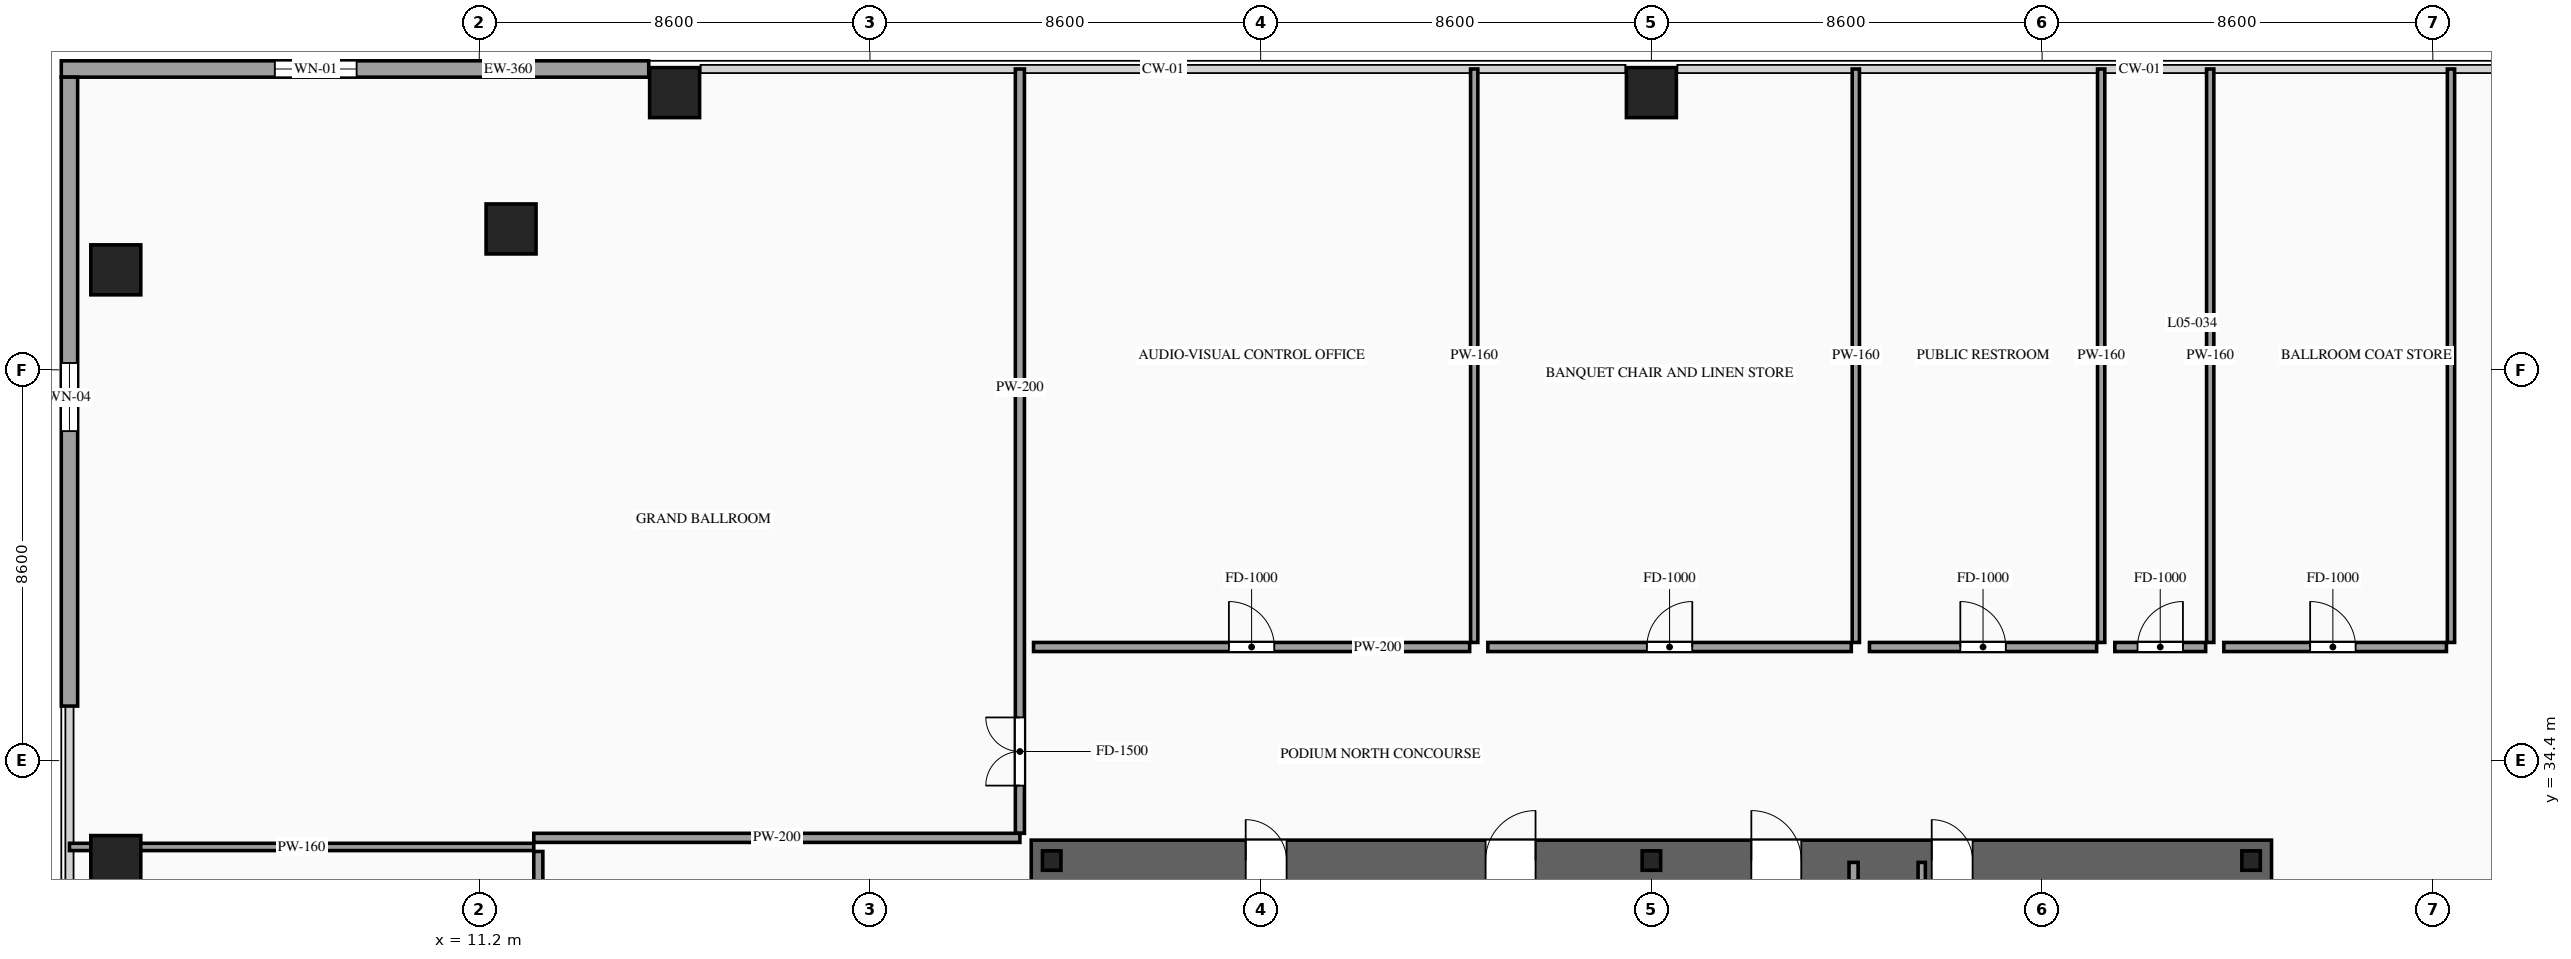
"""IFC4 building model, lengths in metres.
Left out: names, types, materials, properties, quantities, classifications, styles, units other than length and angle.
Written with IfcOpenShell. Run it as: python <this file> out.ifc"""

import sys

from ifc_helpers import new_model, si_unit, direction, frame, frame_2d, origin, origin_2d, place, context, subcontext, project, spatial, rectangle, i_section, extrude, source, transform, mapped, element, fill, save


model = new_model("IFC4")
c1 = context("Model", 3, precision=1e-05, world=origin(), true_north=direction((0.0, 1.0)))
c2 = subcontext(c1, "Body", "Model", "MODEL_VIEW")
j1 = project(units=[si_unit("LENGTHUNIT", "METRE"), si_unit("PLANEANGLEUNIT", "RADIAN")], contexts=[c1])
p1 = place(None, origin())
s1 = spatial("IfcSite", under=j1, at=p1, CompositionType="ELEMENT")
p2 = place(p1, origin())
s2 = spatial("IfcBuilding", under=s1, at=p2, CompositionType="ELEMENT")
p3 = place(p2, frame((0.0, 0.0, 19.8)))
s3 = spatial("IfcBuildingStorey", under=s2, at=p3, CompositionType="ELEMENT", Elevation=19.8)
p4 = place(p3, frame((23.35, 32.2, 0.0), z_axis=(0.0, 0.0, 1.0), x_axis=(1.0, 0.0, 0.0)))
e1 = element("IfcWall", 1, at=p4, inside=s3, PredefinedType="SHEAR", context=c2, shape_type="SweptSolid", body=[
    extrude(rectangle(XDim=27.3, YDim=0.9, at=frame_2d((13.65, 0.0))), origin(), (0.0, 0.0, 1.0), 6.0),
])
p5 = place(p4, frame((4.72, 0.0, 0.0)))
e2 = element("IfcOpeningElement", 2, at=p5, cuts=e1, PredefinedType="OPENING", context=c2, shape_type="SweptSolid", body=[
    extrude(rectangle(XDim=0.9, YDim=2.15, at=frame_2d((0.45, 1.075))), frame((0.0, 0.465, 0.0), z_axis=(0.0, -1.0, 0.0), x_axis=(1.0, 0.0, 0.0)), (0.0, 0.0, 1.0), 0.93),
])
p6 = place(p4, frame((10.0, 0.0, 0.0)))
e3 = element("IfcOpeningElement", 3, at=p6, cuts=e1, PredefinedType="OPENING", context=c2, shape_type="SweptSolid", body=[
    extrude(rectangle(XDim=1.1, YDim=2.2, at=frame_2d((0.55, 1.1))), frame((0.0, 0.465, 0.0), z_axis=(0.0, -1.0, 0.0), x_axis=(1.0, 0.0, 0.0)), (0.0, 0.0, 1.0), 0.93),
])
p7 = place(p4, frame((15.85, 0.0, 0.0)))
e4 = element("IfcOpeningElement", 4, at=p7, cuts=e1, PredefinedType="OPENING", context=c2, shape_type="SweptSolid", body=[
    extrude(rectangle(XDim=1.1, YDim=2.2, at=frame_2d((0.55, 1.1))), frame((0.0, 0.465, 0.0), z_axis=(0.0, -1.0, 0.0), x_axis=(1.0, 0.0, 0.0)), (0.0, 0.0, 1.0), 0.93),
])
p8 = place(p4, frame((19.82, 0.0, 0.0)))
e5 = element("IfcOpeningElement", 5, at=p8, cuts=e1, PredefinedType="OPENING", context=c2, shape_type="SweptSolid", body=[
    extrude(rectangle(XDim=0.9, YDim=2.15, at=frame_2d((0.45, 1.075))), frame((0.0, 0.465, 0.0), z_axis=(0.0, -1.0, 0.0), x_axis=(1.0, 0.0, 0.0)), (0.0, 0.0, 1.0), 0.93),
])
m1 = source(origin(), c2, "Body", "SweptSolid", [
    extrude(i_section(OverallWidth=0.407, OverallDepth=0.428, WebThickness=0.02, FlangeThickness=0.035, at=origin_2d()), origin(), (0.0, 0.0, 1.0), 6.0),
])
for number, where, z_axis, x_axis in (
    (6, (23.8, 32.2, 0.0), (0.0, 0.0, 1.0), (1.0, 0.0, 0.0)),
    (7, (37.0, 32.2, 0.0), (0.0, 0.0, 1.0), (1.0, 0.0, 0.0)),
    (8, (50.2, 32.2, 0.0), (0.0, 0.0, 1.0), (1.0, 0.0, 0.0)),
):
    element("IfcColumn", number, at=place(p3, frame(where, z_axis=z_axis, x_axis=x_axis)), inside=s3, PredefinedType="COLUMN", context=c2, shape_type="MappedRepresentation", body=[
        mapped(m1, transform((0.0, 0.0, 0.0), scale=1.0)),
    ])
m2 = source(origin(), c2, "Body", "SweptSolid", [
    extrude(rectangle(XDim=1.1, YDim=1.1, at=origin_2d()), origin(), (0.0, 0.0, 1.0), 6.0),
])
for number, where, z_axis, x_axis in (
    (9, (3.2, 32.2, 0.0), (0.0, 0.0, 1.0), (1.0, 0.0, 0.0)),
    (10, (3.2, 45.2, 0.0), (0.0, 0.0, 1.0), (1.0, 0.0, 0.0)),
    (11, (11.9, 46.1, 0.0), (0.0, 0.0, 1.0), (1.0, 0.0, 0.0)),
    (12, (15.5, 49.1, 0.0), (0.0, 0.0, 1.0), (1.0, 0.0, 0.0)),
    (13, (37.0, 49.1, 0.0), (0.0, 0.0, 1.0), (1.0, 0.0, 0.0)),
):
    element("IfcColumn", number, at=place(p3, frame(where, z_axis=z_axis, x_axis=x_axis)), inside=s3, PredefinedType="COLUMN", context=c2, shape_type="MappedRepresentation", body=[
        mapped(m2, transform((0.0, 0.0, 0.0), scale=1.0)),
    ])
p9 = place(p3, frame((2.0, 49.62, 0.0), z_axis=(0.0, 0.0, 1.0), x_axis=(1.0, 0.0, 0.0)))
e14 = element("IfcWall", 14, at=p9, inside=s3, PredefinedType="SOLIDWALL", context=c2, shape_type="SweptSolid", body=[
    extrude(rectangle(XDim=12.93, YDim=0.36, at=frame_2d((6.465, 0.0))), origin(), (0.0, 0.0, 1.0), 5.68),
])
p10 = place(p9, frame((4.7, 0.0, 0.9)))
e15 = element("IfcOpeningElement", 15, at=p10, cuts=e14, PredefinedType="OPENING", context=c2, shape_type="SweptSolid", body=[
    extrude(rectangle(XDim=1.8, YDim=2.2, at=frame_2d((0.9, 1.1))), frame((0.0, 0.195, 0.0), z_axis=(0.0, -1.0, 0.0), x_axis=(1.0, 0.0, 0.0)), (0.0, 0.0, 1.0), 0.39),
])
p11 = place(p3, frame((2.18, 35.6, 0.0), z_axis=(0.0, 0.0, 1.0), x_axis=(0.0, 1.0, 0.0)))
e16 = element("IfcWall", 16, at=p11, inside=s3, PredefinedType="SOLIDWALL", context=c2, shape_type="SweptSolid", body=[
    extrude(rectangle(XDim=13.84, YDim=0.36, at=frame_2d((6.92, 0.0))), origin(), (0.0, 0.0, 1.0), 5.68),
])
p12 = place(p11, frame((6.05, 0.0, 0.9)))
e17 = element("IfcOpeningElement", 17, at=p12, cuts=e16, PredefinedType="OPENING", context=c2, shape_type="SweptSolid", body=[
    extrude(rectangle(XDim=1.5, YDim=1.8, at=frame_2d((0.75, 0.9))), frame((0.0, 0.195, 0.0), z_axis=(0.0, -1.0, 0.0), x_axis=(1.0, 0.0, 0.0)), (0.0, 0.0, 1.0), 0.39),
])
m3 = source(origin(), c2, "Body", "SweptSolid", [
    extrude(rectangle(XDim=12.72, YDim=0.2, at=frame_2d((6.36, 0.0))), origin(), (0.0, 0.0, 1.0), 5.68),
])
p13 = place(p3, frame((41.45, 19.44, 0.0), z_axis=(0.0, 0.0, 1.0), x_axis=(0.0, 1.0, 0.0)))
e18 = element("IfcWall", 18, at=p13, inside=s3, PredefinedType="PARTITIONING", context=c2, shape_type="MappedRepresentation", body=[
    mapped(m3, transform((0.0, 0.0, 0.0), scale=1.0)),
])
m4 = source(origin(), c2, "Body", "SweptSolid", [
    extrude(rectangle(XDim=10.72, YDim=0.16, at=frame_2d((5.36, 0.0))), origin(), (0.0, 0.0, 1.0), 5.68),
])
p14 = place(p3, frame((42.95, 21.44, 0.0), z_axis=(0.0, 0.0, 1.0), x_axis=(0.0, 1.0, 0.0)))
e19 = element("IfcWall", 19, at=p14, inside=s3, PredefinedType="PARTITIONING", context=c2, shape_type="MappedRepresentation", body=[
    mapped(m4, transform((0.0, 0.0, 0.0), scale=1.0)),
])
p15 = place(p3, frame((23.1, 32.8, 0.0), z_axis=(0.0, 0.0, 1.0), x_axis=(0.0, 1.0, 0.0)))
e20 = element("IfcWall", 20, at=p15, inside=s3, PredefinedType="PARTITIONING", context=c2, shape_type="SweptSolid", body=[
    extrude(rectangle(XDim=16.82, YDim=0.2, at=frame_2d((8.41, 0.0))), origin(), (0.0, 0.0, 1.0), 5.68),
])
p16 = place(p15, frame((1.05, 0.0, 0.0)))
e21 = element("IfcOpeningElement", 21, at=p16, cuts=e20, PredefinedType="OPENING", context=c2, shape_type="SweptSolid", body=[
    extrude(rectangle(XDim=1.5, YDim=2.3, at=frame_2d((0.75, 1.15))), frame((0.0, 0.115, 0.0), z_axis=(0.0, -1.0, 0.0), x_axis=(1.0, 0.0, 0.0)), (0.0, 0.0, 1.0), 0.23),
])
m5 = source(origin(), c2, "Body", "SweptSolid", [
    extrude(rectangle(XDim=10.7, YDim=0.2, at=frame_2d((5.35, 0.0))), origin(), (0.0, 0.0, 1.0), 5.68),
])
p17 = place(p3, frame((12.4, 32.7, 0.0), z_axis=(0.0, 0.0, 1.0), x_axis=(1.0, 0.0, 0.0)))
e22 = element("IfcWall", 22, at=p17, inside=s3, PredefinedType="PARTITIONING", context=c2, shape_type="MappedRepresentation", body=[
    mapped(m5, transform((0.0, 0.0, 0.0), scale=1.0)),
])
p18 = place(p3, frame((12.5, 12.0, 0.0), z_axis=(0.0, 0.0, 1.0), x_axis=(0.0, 1.0, 0.0)))
e23 = element("IfcWall", 23, at=p18, inside=s3, PredefinedType="PARTITIONING", context=c2, shape_type="SweptSolid", body=[
    extrude(rectangle(XDim=20.4, YDim=0.2, at=frame_2d((10.2, 0.0))), origin(), (0.0, 0.0, 1.0), 5.68),
])
p19 = place(p18, frame((5.0, 0.0, 0.0)))
e24 = element("IfcOpeningElement", 24, at=p19, cuts=e23, PredefinedType="OPENING", context=c2, shape_type="SweptSolid", body=[
    extrude(rectangle(XDim=1.0, YDim=2.2, at=frame_2d((0.5, 1.1))), frame((0.0, 0.115, 0.0), z_axis=(0.0, -1.0, 0.0), x_axis=(1.0, 0.0, 0.0)), (0.0, 0.0, 1.0), 0.23),
])
m6 = source(origin(), c2, "Body", "SweptSolid", [
    extrude(rectangle(XDim=10.22, YDim=0.16, at=frame_2d((5.11, 0.0))), origin(), (0.0, 0.0, 1.0), 5.68),
])
p20 = place(p3, frame((2.18, 32.5, 0.0), z_axis=(0.0, 0.0, 1.0), x_axis=(1.0, 0.0, 0.0)))
e25 = element("IfcWall", 25, at=p20, inside=s3, PredefinedType="PARTITIONING", context=c2, shape_type="MappedRepresentation", body=[
    mapped(m6, transform((0.0, 0.0, 0.0), scale=1.0)),
])
p21 = place(p3, frame((23.4, 36.9, 0.0), z_axis=(0.0, 0.0, 1.0), x_axis=(1.0, 0.0, 0.0)))
e26 = element("IfcWall", 26, at=p21, inside=s3, PredefinedType="PARTITIONING", context=c2, shape_type="SweptSolid", body=[
    extrude(rectangle(XDim=9.6, YDim=0.2, at=frame_2d((4.8, 0.0))), origin(), (0.0, 0.0, 1.0), 5.68),
])
p22 = place(p21, frame((4.3, 0.0, 0.0)))
e27 = element("IfcOpeningElement", 27, at=p22, cuts=e26, PredefinedType="OPENING", context=c2, shape_type="SweptSolid", body=[
    extrude(rectangle(XDim=1.0, YDim=2.2, at=frame_2d((0.5, 1.1))), frame((0.0, 0.115, 0.0), z_axis=(0.0, -1.0, 0.0), x_axis=(1.0, 0.0, 0.0)), (0.0, 0.0, 1.0), 0.23),
])
m7 = source(origin(), c2, "Body", "SweptSolid", [
    extrude(rectangle(XDim=12.62, YDim=0.16, at=frame_2d((6.31, 0.0))), origin(), (0.0, 0.0, 1.0), 5.68),
])
p23 = place(p3, frame((33.1, 37.0, 0.0), z_axis=(0.0, 0.0, 1.0), x_axis=(0.0, 1.0, 0.0)))
e28 = element("IfcWall", 28, at=p23, inside=s3, PredefinedType="PARTITIONING", context=c2, shape_type="MappedRepresentation", body=[
    mapped(m7, transform((0.0, 0.0, 0.0), scale=1.0)),
])
p24 = place(p3, frame((33.4, 36.9, 0.0), z_axis=(0.0, 0.0, 1.0), x_axis=(1.0, 0.0, 0.0)))
e29 = element("IfcWall", 29, at=p24, inside=s3, PredefinedType="PARTITIONING", context=c2, shape_type="SweptSolid", body=[
    extrude(rectangle(XDim=8.0, YDim=0.2, at=frame_2d((4.0, 0.0))), origin(), (0.0, 0.0, 1.0), 5.68),
])
p25 = place(p24, frame((3.5, 0.0, 0.0)))
e30 = element("IfcOpeningElement", 30, at=p25, cuts=e29, PredefinedType="OPENING", context=c2, shape_type="SweptSolid", body=[
    extrude(rectangle(XDim=1.0, YDim=2.2, at=frame_2d((0.5, 1.1))), frame((0.0, 0.115, 0.0), z_axis=(0.0, -1.0, 0.0), x_axis=(1.0, 0.0, 0.0)), (0.0, 0.0, 1.0), 0.23),
])
p26 = place(p3, frame((41.5, 37.0, 0.0), z_axis=(0.0, 0.0, 1.0), x_axis=(0.0, 1.0, 0.0)))
e31 = element("IfcWall", 31, at=p26, inside=s3, PredefinedType="PARTITIONING", context=c2, shape_type="MappedRepresentation", body=[
    mapped(m7, transform((0.0, 0.0, 0.0), scale=1.0)),
])
p27 = place(p3, frame((41.8, 36.9, 0.0), z_axis=(0.0, 0.0, 1.0), x_axis=(1.0, 0.0, 0.0)))
e32 = element("IfcWall", 32, at=p27, inside=s3, PredefinedType="PARTITIONING", context=c2, shape_type="SweptSolid", body=[
    extrude(rectangle(XDim=5.0, YDim=0.2, at=frame_2d((2.5, 0.0))), origin(), (0.0, 0.0, 1.0), 5.68),
])
p28 = place(p27, frame((2.0, 0.0, 0.0)))
e33 = element("IfcOpeningElement", 33, at=p28, cuts=e32, PredefinedType="OPENING", context=c2, shape_type="SweptSolid", body=[
    extrude(rectangle(XDim=1.0, YDim=2.2, at=frame_2d((0.5, 1.1))), frame((0.0, 0.115, 0.0), z_axis=(0.0, -1.0, 0.0), x_axis=(1.0, 0.0, 0.0)), (0.0, 0.0, 1.0), 0.23),
])
p29 = place(p3, frame((46.9, 37.0, 0.0), z_axis=(0.0, 0.0, 1.0), x_axis=(0.0, 1.0, 0.0)))
e34 = element("IfcWall", 34, at=p29, inside=s3, PredefinedType="PARTITIONING", context=c2, shape_type="MappedRepresentation", body=[
    mapped(m7, transform((0.0, 0.0, 0.0), scale=1.0)),
])
p30 = place(p3, frame((47.2, 36.9, 0.0), z_axis=(0.0, 0.0, 1.0), x_axis=(1.0, 0.0, 0.0)))
e35 = element("IfcWall", 35, at=p30, inside=s3, PredefinedType="PARTITIONING", context=c2, shape_type="SweptSolid", body=[
    extrude(rectangle(XDim=2.0, YDim=0.2, at=frame_2d((1.0, 0.0))), origin(), (0.0, 0.0, 1.0), 5.68),
])
p31 = place(p30, frame((0.5, 0.0, 0.0)))
e36 = element("IfcOpeningElement", 36, at=p31, cuts=e35, PredefinedType="OPENING", context=c2, shape_type="SweptSolid", body=[
    extrude(rectangle(XDim=1.0, YDim=2.2, at=frame_2d((0.5, 1.1))), frame((0.0, 0.115, 0.0), z_axis=(0.0, -1.0, 0.0), x_axis=(1.0, 0.0, 0.0)), (0.0, 0.0, 1.0), 0.23),
])
p32 = place(p3, frame((49.3, 37.0, 0.0), z_axis=(0.0, 0.0, 1.0), x_axis=(0.0, 1.0, 0.0)))
e37 = element("IfcWall", 37, at=p32, inside=s3, PredefinedType="PARTITIONING", context=c2, shape_type="MappedRepresentation", body=[
    mapped(m7, transform((0.0, 0.0, 0.0), scale=1.0)),
])
p33 = place(p3, frame((49.6, 36.9, 0.0), z_axis=(0.0, 0.0, 1.0), x_axis=(1.0, 0.0, 0.0)))
e38 = element("IfcWall", 38, at=p33, inside=s3, PredefinedType="PARTITIONING", context=c2, shape_type="SweptSolid", body=[
    extrude(rectangle(XDim=4.9, YDim=0.2, at=frame_2d((2.45, 0.0))), origin(), (0.0, 0.0, 1.0), 5.68),
])
p34 = place(p33, frame((1.9, 0.0, 0.0)))
e39 = element("IfcOpeningElement", 39, at=p34, cuts=e38, PredefinedType="OPENING", context=c2, shape_type="SweptSolid", body=[
    extrude(rectangle(XDim=1.0, YDim=2.2, at=frame_2d((0.5, 1.1))), frame((0.0, 0.115, 0.0), z_axis=(0.0, -1.0, 0.0), x_axis=(1.0, 0.0, 0.0)), (0.0, 0.0, 1.0), 0.23),
])
p35 = place(p3, frame((54.6, 37.0, 0.0), z_axis=(0.0, 0.0, 1.0), x_axis=(0.0, 1.0, 0.0)))
e40 = element("IfcWall", 40, at=p35, inside=s3, PredefinedType="PARTITIONING", context=c2, shape_type="MappedRepresentation", body=[
    mapped(m7, transform((0.0, 0.0, 0.0), scale=1.0)),
])
m8 = source(origin(), c2, "Body", "SweptSolid", [
    extrude(rectangle(XDim=1.8, YDim=2.2, at=frame_2d((0.9, 1.1))), frame((0.0, 0.03, 0.0), z_axis=(0.0, -1.0, 0.0), x_axis=(1.0, 0.0, 0.0)), (0.0, 0.0, 1.0), 0.06),
])
p36 = place(p10, origin())
e41 = element("IfcWindow", 41, at=p36, inside=s3, PartitioningType="SINGLE_PANEL", PredefinedType="WINDOW", context=c2, shape_type="MappedRepresentation", body=[
    mapped(m8, transform((0.0, 0.0, 0.0), scale=1.0)),
])
fill(e15, e41)
m9 = source(origin(), c2, "Body", "SweptSolid", [
    extrude(rectangle(XDim=1.5, YDim=1.8, at=frame_2d((0.75, 0.9))), frame((0.0, 0.03, 0.0), z_axis=(0.0, -1.0, 0.0), x_axis=(1.0, 0.0, 0.0)), (0.0, 0.0, 1.0), 0.06),
])
p37 = place(p12, origin())
e42 = element("IfcWindow", 42, at=p37, inside=s3, PartitioningType="SINGLE_PANEL", PredefinedType="WINDOW", context=c2, shape_type="MappedRepresentation", body=[
    mapped(m9, transform((0.0, 0.0, 0.0), scale=1.0)),
])
fill(e17, e42)
m10 = source(origin(), c2, "Body", "SweptSolid", [
    extrude(rectangle(XDim=0.9, YDim=2.15, at=frame_2d((0.45, 1.075))), frame((0.0, 0.025, 0.0), z_axis=(0.0, -1.0, 0.0), x_axis=(1.0, 0.0, 0.0)), (0.0, 0.0, 1.0), 0.05),
])
p38 = place(p5, origin())
e43 = element("IfcDoor", 43, at=p38, inside=s3, OperationType="SINGLE_SWING_LEFT", PredefinedType="DOOR", context=c2, shape_type="MappedRepresentation", body=[
    mapped(m10, transform((0.0, 0.0, 0.0), scale=1.0)),
])
fill(e2, e43)
m11 = source(origin(), c2, "Body", "SweptSolid", [
    extrude(rectangle(XDim=1.1, YDim=2.2, at=frame_2d((0.55, 1.1))), frame((0.0, 0.025, 0.0), z_axis=(0.0, -1.0, 0.0), x_axis=(1.0, 0.0, 0.0)), (0.0, 0.0, 1.0), 0.05),
])
p39 = place(p6, origin())
e44 = element("IfcDoor", 44, at=p39, inside=s3, OperationType="SINGLE_SWING_RIGHT", PredefinedType="DOOR", context=c2, shape_type="MappedRepresentation", body=[
    mapped(m11, transform((0.0, 0.0, 0.0), scale=1.0)),
])
fill(e3, e44)
p40 = place(p7, origin())
e45 = element("IfcDoor", 45, at=p40, inside=s3, OperationType="SINGLE_SWING_LEFT", PredefinedType="DOOR", context=c2, shape_type="MappedRepresentation", body=[
    mapped(m11, transform((0.0, 0.0, 0.0), scale=1.0)),
])
fill(e4, e45)
p41 = place(p8, origin())
e46 = element("IfcDoor", 46, at=p41, inside=s3, OperationType="SINGLE_SWING_LEFT", PredefinedType="DOOR", context=c2, shape_type="MappedRepresentation", body=[
    mapped(m10, transform((0.0, 0.0, 0.0), scale=1.0)),
])
fill(e5, e46)
m12 = source(origin(), c2, "Body", "SweptSolid", [
    extrude(rectangle(XDim=1.5, YDim=2.3, at=frame_2d((0.75, 1.15))), frame((0.0, 0.025, 0.0), z_axis=(0.0, -1.0, 0.0), x_axis=(1.0, 0.0, 0.0)), (0.0, 0.0, 1.0), 0.05),
])
p42 = place(p16, origin())
e47 = element("IfcDoor", 47, at=p42, inside=s3, OperationType="DOUBLE_DOOR_SINGLE_SWING", PredefinedType="DOOR", context=c2, shape_type="MappedRepresentation", body=[
    mapped(m12, transform((0.0, 0.0, 0.0), scale=1.0)),
])
fill(e21, e47)
m13 = source(origin(), c2, "Body", "SweptSolid", [
    extrude(rectangle(XDim=1.0, YDim=2.2, at=frame_2d((0.5, 1.1))), frame((0.0, 0.025, 0.0), z_axis=(0.0, -1.0, 0.0), x_axis=(1.0, 0.0, 0.0)), (0.0, 0.0, 1.0), 0.05),
])
p43 = place(p22, origin())
e48 = element("IfcDoor", 48, at=p43, inside=s3, OperationType="SINGLE_SWING_LEFT", PredefinedType="DOOR", context=c2, shape_type="MappedRepresentation", body=[
    mapped(m13, transform((0.0, 0.0, 0.0), scale=1.0)),
])
fill(e27, e48)
p44 = place(p25, origin())
e49 = element("IfcDoor", 49, at=p44, inside=s3, OperationType="SINGLE_SWING_RIGHT", PredefinedType="DOOR", context=c2, shape_type="MappedRepresentation", body=[
    mapped(m13, transform((0.0, 0.0, 0.0), scale=1.0)),
])
fill(e30, e49)
p45 = place(p28, origin())
e50 = element("IfcDoor", 50, at=p45, inside=s3, OperationType="SINGLE_SWING_LEFT", PredefinedType="DOOR", context=c2, shape_type="MappedRepresentation", body=[
    mapped(m13, transform((0.0, 0.0, 0.0), scale=1.0)),
])
fill(e33, e50)
p46 = place(p31, origin())
e51 = element("IfcDoor", 51, at=p46, inside=s3, OperationType="SINGLE_SWING_RIGHT", PredefinedType="DOOR", context=c2, shape_type="MappedRepresentation", body=[
    mapped(m13, transform((0.0, 0.0, 0.0), scale=1.0)),
])
fill(e36, e51)
p47 = place(p34, origin())
e52 = element("IfcDoor", 52, at=p47, inside=s3, OperationType="SINGLE_SWING_LEFT", PredefinedType="DOOR", context=c2, shape_type="MappedRepresentation", body=[
    mapped(m13, transform((0.0, 0.0, 0.0), scale=1.0)),
])
fill(e39, e52)
save(model, sys.argv[1])
